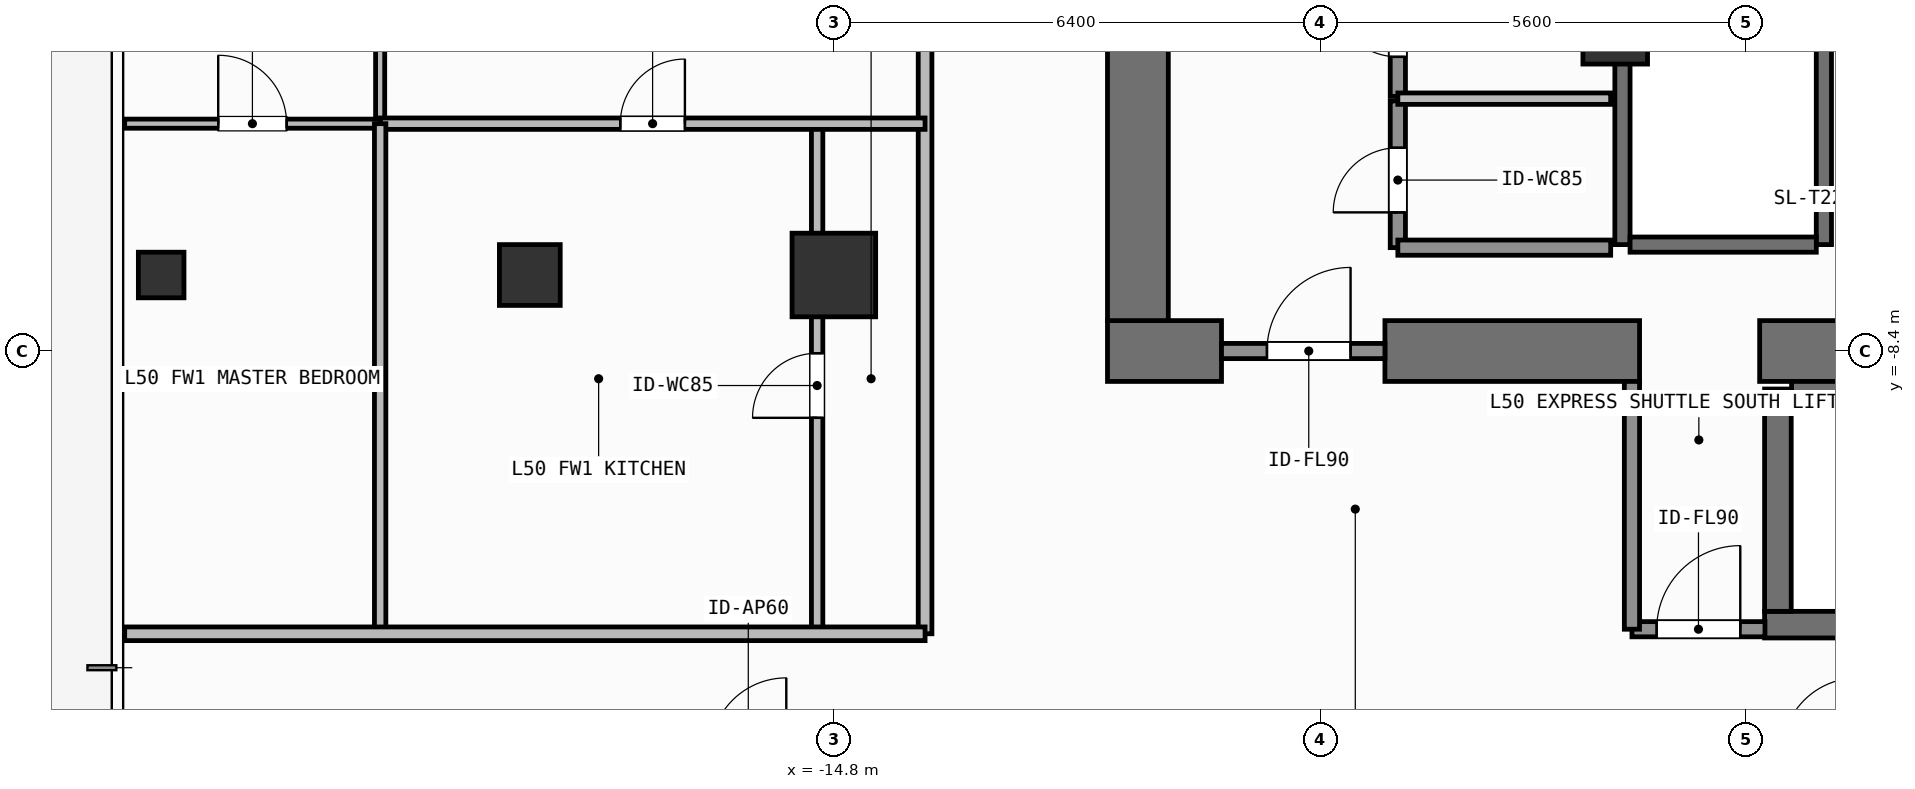
"""IFC4 building model, lengths in metres.
Left out: names, types, materials, properties, quantities, classifications, styles, units other than length and angle.
Written with IfcOpenShell. Run it as: python <this file> out.ifc"""

import sys

from ifc_helpers import new_model, si_unit, direction, frame, frame_2d, origin, origin_2d, place, context, subcontext, project, spatial, rectangle, hollow_rectangle, extrude, element, fill, save


model = new_model("IFC4")
c1 = context("Model", 3, precision=1e-05, world=origin(), true_north=direction((0.0, 1.0)))
c2 = subcontext(c1, "Body", "Model", "MODEL_VIEW")
j1 = project(units=[si_unit("LENGTHUNIT", "METRE"), si_unit("PLANEANGLEUNIT", "RADIAN")], contexts=[c1])
p1 = place(None, origin())
s1 = spatial("IfcSite", under=j1, at=p1, CompositionType="ELEMENT")
p2 = place(p1, origin())
s2 = spatial("IfcBuilding", under=s1, at=p2, CompositionType="ELEMENT")
p3 = place(p2, frame((0.0, 0.0, 203.1)))
s3 = spatial("IfcBuildingStorey", under=s2, at=p3, CompositionType="ELEMENT", Elevation=203.1)
p4 = place(p3, frame((-11.2, -8.4, 0.0), z_axis=(0.0, 0.0, 1.0), x_axis=(1.0, 0.0, 0.0)))
e1 = element("IfcWall", 1, at=p4, inside=s3, PredefinedType="SHEAR", context=c2, shape_type="SweptSolid", body=[
    extrude(rectangle(XDim=1.5, YDim=0.8, at=frame_2d((0.75, 0.0))), origin(), (0.0, 0.0, 1.0), 3.9),
])
p5 = place(p3, frame((-7.55, -8.4, 0.0), z_axis=(0.0, 0.0, 1.0), x_axis=(1.0, 0.0, 0.0)))
e2 = element("IfcWall", 2, at=p5, inside=s3, PredefinedType="SHEAR", context=c2, shape_type="SweptSolid", body=[
    extrude(rectangle(XDim=3.35, YDim=0.8, at=frame_2d((1.675, 0.0))), origin(), (0.0, 0.0, 1.0), 3.9),
])
p6 = place(p3, frame((-2.62, -8.4, 0.0), z_axis=(0.0, 0.0, 1.0), x_axis=(1.0, 0.0, 0.0)))
e3 = element("IfcWall", 3, at=p6, inside=s3, PredefinedType="SHEAR", context=c2, shape_type="SweptSolid", body=[
    extrude(rectangle(XDim=7.27, YDim=0.8, at=frame_2d((3.635, 0.0))), origin(), (0.0, 0.0, 1.0), 3.9),
])
p7 = place(p3, frame((-10.8, -8.0, 0.0), z_axis=(0.0, 0.0, 1.0), x_axis=(0.0, 1.0, 0.0)))
e4 = element("IfcWall", 4, at=p7, inside=s3, PredefinedType="SHEAR", context=c2, shape_type="SweptSolid", body=[
    extrude(rectangle(XDim=16.0, YDim=0.8, at=frame_2d((8.0, 0.0))), origin(), (0.0, 0.0, 1.0), 3.9),
])
p8 = place(p3, frame((-2.555, -12.0, 0.0), z_axis=(0.0, 0.0, 1.0), x_axis=(1.0, 0.0, 0.0)))
e5 = element("IfcWall", 5, at=p8, inside=s3, PredefinedType="SHEAR", context=c2, shape_type="SweptSolid", body=[
    extrude(rectangle(XDim=7.31, YDim=0.35, at=frame_2d((3.655, 0.0))), origin(), (0.0, 0.0, 1.0), 3.9),
])
p9 = place(p3, frame((-2.2, -8.913, 0.0), z_axis=(0.0, 0.0, 1.0), x_axis=(1.0, 0.0, 0.0)))
e6 = element("IfcWall", 6, at=p9, inside=s3, PredefinedType="SHEAR", context=c2, shape_type="SweptSolid", body=[
    extrude(rectangle(XDim=6.6, YDim=0.225, at=frame_2d((3.3, 0.0))), origin(), (0.0, 0.0, 1.0), 3.9),
])
p10 = place(p3, frame((-2.38, -11.825, 0.0), z_axis=(0.0, 0.0, 1.0), x_axis=(0.0, 1.0, 0.0)))
e7 = element("IfcWall", 7, at=p10, inside=s3, PredefinedType="SHEAR", context=c2, shape_type="SweptSolid", body=[
    extrude(rectangle(XDim=2.925, YDim=0.35, at=frame_2d((1.462, 0.0))), origin(), (0.0, 0.0, 1.0), 3.9),
])
p11 = place(p3, frame((-14.8, -7.4, 0.0), z_axis=(0.0, 0.0, 1.0), x_axis=(1.0, 0.0, 0.0)))
e8 = element("IfcColumn", 8, at=p11, inside=s3, PredefinedType="COLUMN", context=c2, shape_type="SweptSolid", body=[
    extrude(rectangle(XDim=1.1, YDim=1.1, at=origin_2d()), origin(), (0.0, 0.0, 1.0), 3.9),
])
p12 = place(p3, frame((-4.52, -4.2, 0.0), z_axis=(0.0, 0.0, 1.0), x_axis=(1.0, 0.0, 0.0)))
e9 = element("IfcColumn", 9, at=p12, inside=s3, PredefinedType="COLUMN", context=c2, shape_type="SweptSolid", body=[
    extrude(rectangle(XDim=0.85, YDim=0.85, at=origin_2d()), origin(), (0.0, 0.0, 1.0), 3.9),
])
p13 = place(p3, frame((-18.8, -7.4, 0.0), z_axis=(0.0, 0.0, 1.0), x_axis=(1.0, 0.0, 0.0)))
e10 = element("IfcColumn", 10, at=p13, inside=s3, PredefinedType="COLUMN", context=c2, shape_type="SweptSolid", body=[
    extrude(hollow_rectangle(XDim=0.8, YDim=0.8, WallThickness=0.036, at=origin_2d()), origin(), (0.0, 0.0, 1.0), 3.9),
])
p14 = place(p3, frame((-23.65, -7.4, 0.0), z_axis=(0.0, 0.0, 1.0), x_axis=(1.0, 0.0, 0.0)))
e11 = element("IfcColumn", 11, at=p14, inside=s3, PredefinedType="COLUMN", context=c2, shape_type="SweptSolid", body=[
    extrude(hollow_rectangle(XDim=0.6, YDim=0.6, WallThickness=0.028, at=origin_2d()), origin(), (0.0, 0.0, 1.0), 3.9),
])
for number, where, z_axis, x_axis in (
    (12, (-4.425, -7.0, 0.0), (0.0, 0.0, 1.0), (0.0, 1.0, 0.0)),
    (13, (-1.775, -7.0, 0.0), (0.0, 0.0, 1.0), (0.0, 1.0, 0.0)),
):
    element("IfcWall", number, at=place(p3, frame(where, z_axis=z_axis, x_axis=x_axis)), inside=s3, PredefinedType="SHEAR", context=c2, shape_type="SweptSolid", body=[
        extrude(rectangle(XDim=2.8, YDim=0.2, at=frame_2d((1.4, 0.0))), origin(), (0.0, 0.0, 1.0), 3.68),
    ])
p15 = place(p3, frame((-4.325, -7.0, 0.0), z_axis=(0.0, 0.0, 1.0), x_axis=(1.0, 0.0, 0.0)))
e14 = element("IfcWall", 14, at=p15, inside=s3, PredefinedType="SHEAR", context=c2, shape_type="SweptSolid", body=[
    extrude(rectangle(XDim=2.45, YDim=0.2, at=frame_2d((1.225, 0.0))), origin(), (0.0, 0.0, 1.0), 3.68),
])
p16 = place(p3, frame((-9.7, -8.4, 0.0), z_axis=(0.0, 0.0, 1.0), x_axis=(1.0, 0.0, 0.0)))
e15 = element("IfcWall", 15, at=p16, inside=s3, PredefinedType="SOLIDWALL", context=c2, shape_type="SweptSolid", body=[
    extrude(rectangle(XDim=2.15, YDim=0.2, at=frame_2d((1.075, 0.0))), origin(), (0.0, 0.0, 1.0), 2.82),
])
p17 = place(p16, frame((0.598, 0.0, 0.0)))
e16 = element("IfcOpeningElement", 16, at=p17, cuts=e15, PredefinedType="OPENING", context=c2, shape_type="SweptSolid", body=[
    extrude(rectangle(XDim=1.1, YDim=2.15, at=frame_2d((0.55, 1.075))), frame((0.0, 0.11, 0.0), z_axis=(0.0, -1.0, 0.0), x_axis=(1.0, 0.0, 0.0)), (0.0, 0.0, 1.0), 0.22),
])
p18 = place(p3, frame((-4.3, -12.06, 0.0), z_axis=(0.0, 0.0, 1.0), x_axis=(1.0, 0.0, 0.0)))
e17 = element("IfcWall", 17, at=p18, inside=s3, PredefinedType="SOLIDWALL", context=c2, shape_type="SweptSolid", body=[
    extrude(rectangle(XDim=1.75, YDim=0.2, at=frame_2d((0.875, 0.0))), origin(), (0.0, 0.0, 1.0), 3.68),
])
p19 = place(p18, frame((0.325, 0.0, 0.0)))
e18 = element("IfcOpeningElement", 18, at=p19, cuts=e17, PredefinedType="OPENING", context=c2, shape_type="SweptSolid", body=[
    extrude(rectangle(XDim=1.1, YDim=2.15, at=frame_2d((0.55, 1.075))), frame((0.0, 0.11, 0.0), z_axis=(0.0, -1.0, 0.0), x_axis=(1.0, 0.0, 0.0)), (0.0, 0.0, 1.0), 0.22),
])
p20 = place(p3, frame((-7.38, -7.04, 0.0), z_axis=(0.0, 0.0, 1.0), x_axis=(0.0, 1.0, 0.0)))
e19 = element("IfcWall", 19, at=p20, inside=s3, PredefinedType="SOLIDWALL", context=c2, shape_type="SweptSolid", body=[
    extrude(rectangle(XDim=1.93, YDim=0.2, at=frame_2d((0.965, 0.0))), origin(), (0.0, 0.0, 1.0), 3.68),
])
p21 = place(p20, frame((0.464, 0.0, 0.0)))
e20 = element("IfcOpeningElement", 20, at=p21, cuts=e19, PredefinedType="OPENING", context=c2, shape_type="SweptSolid", body=[
    extrude(rectangle(XDim=0.85, YDim=2.1, at=frame_2d((0.425, 1.05))), frame((0.0, 0.11, 0.0), z_axis=(0.0, -1.0, 0.0), x_axis=(1.0, 0.0, 0.0)), (0.0, 0.0, 1.0), 0.22),
])
p22 = place(p3, frame((-7.38, -5.05, 0.0), z_axis=(0.0, 0.0, 1.0), x_axis=(0.0, 1.0, 0.0)))
e21 = element("IfcWall", 21, at=p22, inside=s3, PredefinedType="SOLIDWALL", context=c2, shape_type="SweptSolid", body=[
    extrude(rectangle(XDim=1.89, YDim=0.2, at=frame_2d((0.945, 0.0))), origin(), (0.0, 0.0, 1.0), 3.68),
])
p23 = place(p22, frame((0.52, 0.0, 0.0)))
e22 = element("IfcOpeningElement", 22, at=p23, cuts=e21, PredefinedType="OPENING", context=c2, shape_type="SweptSolid", body=[
    extrude(rectangle(XDim=0.85, YDim=2.1, at=frame_2d((0.425, 1.05))), frame((0.0, 0.11, 0.0), z_axis=(0.0, -1.0, 0.0), x_axis=(1.0, 0.0, 0.0)), (0.0, 0.0, 1.0), 0.22),
])
p24 = place(p3, frame((-13.6, -12.12, 0.0), z_axis=(0.0, 0.0, 1.0), x_axis=(0.0, 1.0, 0.0)))
e23 = element("IfcWall", 23, at=p24, inside=s3, PredefinedType="PARTITIONING", context=c2, shape_type="SweptSolid", body=[
    extrude(rectangle(XDim=23.55, YDim=0.18, at=frame_2d((11.775, 0.0))), origin(), (0.0, 0.0, 1.0), 3.68),
])
p25 = place(p24, frame((11.454, 0.0, 0.0)))
e24 = element("IfcOpeningElement", 24, at=p25, cuts=e23, PredefinedType="OPENING", context=c2, shape_type="SweptSolid", body=[
    extrude(rectangle(XDim=1.0, YDim=2.2, at=frame_2d((0.5, 1.1))), frame((0.0, 0.1, 0.0), z_axis=(0.0, -1.0, 0.0), x_axis=(1.0, 0.0, 0.0)), (0.0, 0.0, 1.0), 0.2),
])
p26 = place(p3, frame((-20.769, -5.409, 0.0), z_axis=(0.0, 0.0, 1.0), x_axis=(0.0, 1.0, 0.0)))
e25 = element("IfcWall", 25, at=p26, inside=s3, PredefinedType="PARTITIONING", context=c2, shape_type="SweptSolid", body=[
    extrude(rectangle(XDim=10.691, YDim=0.12, at=frame_2d((5.345, 0.0))), origin(), (0.0, 0.0, 1.0), 3.68),
])
p27 = place(p26, frame((4.806, 0.0, 0.0)))
e26 = element("IfcOpeningElement", 26, at=p27, cuts=e25, PredefinedType="OPENING", context=c2, shape_type="SweptSolid", body=[
    extrude(rectangle(XDim=0.9, YDim=2.1, at=frame_2d((0.45, 1.05))), frame((0.0, 0.07, 0.0), z_axis=(0.0, -1.0, 0.0), x_axis=(1.0, 0.0, 0.0)), (0.0, 0.0, 1.0), 0.14),
])
p28 = place(p3, frame((-15.02, -12.12, 0.0), z_axis=(0.0, 0.0, 1.0), x_axis=(0.0, 1.0, 0.0)))
e27 = element("IfcWall", 27, at=p28, inside=s3, PredefinedType="PARTITIONING", context=c2, shape_type="SweptSolid", body=[
    extrude(rectangle(XDim=6.711, YDim=0.15, at=frame_2d((3.355, 0.0))), origin(), (0.0, 0.0, 1.0), 3.182),
])
p29 = place(p28, frame((2.841, 0.0, 0.0)))
e28 = element("IfcOpeningElement", 28, at=p29, cuts=e27, PredefinedType="OPENING", context=c2, shape_type="SweptSolid", body=[
    extrude(rectangle(XDim=0.85, YDim=2.1, at=frame_2d((0.425, 1.05))), frame((0.0, 0.085, 0.0), z_axis=(0.0, -1.0, 0.0), x_axis=(1.0, 0.0, 0.0)), (0.0, 0.0, 1.0), 0.17),
])
p30 = place(p3, frame((-20.769, -5.409, 0.0), z_axis=(0.0, 0.0, 1.0), x_axis=(1.0, 0.0, 0.0)))
e29 = element("IfcWall", 29, at=p30, inside=s3, PredefinedType="PARTITIONING", context=c2, shape_type="SweptSolid", body=[
    extrude(rectangle(XDim=7.169, YDim=0.15, at=frame_2d((3.584, 0.0))), origin(), (0.0, 0.0, 1.0), 3.68),
])
p31 = place(p30, frame((3.159, 0.0, 0.0)))
e30 = element("IfcOpeningElement", 30, at=p31, cuts=e29, PredefinedType="OPENING", context=c2, shape_type="SweptSolid", body=[
    extrude(rectangle(XDim=0.85, YDim=2.1, at=frame_2d((0.425, 1.05))), frame((0.0, 0.085, 0.0), z_axis=(0.0, -1.0, 0.0), x_axis=(1.0, 0.0, 0.0)), (0.0, 0.0, 1.0), 0.17),
])
p32 = place(p3, frame((-24.13, -5.409, 0.0), z_axis=(0.0, 0.0, 1.0), x_axis=(1.0, 0.0, 0.0)))
e31 = element("IfcWall", 31, at=p32, inside=s3, PredefinedType="PARTITIONING", context=c2, shape_type="SweptSolid", body=[
    extrude(rectangle(XDim=3.361, YDim=0.12, at=frame_2d((1.68, 0.0))), origin(), (0.0, 0.0, 1.0), 3.68),
])
p33 = place(p32, frame((1.23, 0.0, 0.0)))
e32 = element("IfcOpeningElement", 32, at=p33, cuts=e31, PredefinedType="OPENING", context=c2, shape_type="SweptSolid", body=[
    extrude(rectangle(XDim=0.9, YDim=2.1, at=frame_2d((0.45, 1.05))), frame((0.0, 0.07, 0.0), z_axis=(0.0, -1.0, 0.0), x_axis=(1.0, 0.0, 0.0)), (0.0, 0.0, 1.0), 0.14),
])
p34 = place(p3, frame((-4.3, -12.06, 0.0), z_axis=(0.0, 0.0, 1.0), x_axis=(0.0, 1.0, 0.0)))
e33 = element("IfcWall", 33, at=p34, inside=s3, PredefinedType="SOLIDWALL", context=c2, shape_type="SweptSolid", body=[
    extrude(rectangle(XDim=3.26, YDim=0.2, at=frame_2d((1.63, 0.0))), origin(), (0.0, 0.0, 1.0), 3.68),
])
p35 = place(p3, frame((-7.38, -7.04, 0.0), z_axis=(0.0, 0.0, 1.0), x_axis=(1.0, 0.0, 0.0)))
e34 = element("IfcWall", 34, at=p35, inside=s3, PredefinedType="SOLIDWALL", context=c2, shape_type="SweptSolid", body=[
    extrude(rectangle(XDim=2.8, YDim=0.2, at=frame_2d((1.4, 0.0))), origin(), (0.0, 0.0, 1.0), 3.68),
])
p36 = place(p3, frame((-7.38, -5.08, 0.0), z_axis=(0.0, 0.0, 1.0), x_axis=(1.0, 0.0, 0.0)))
e35 = element("IfcWall", 35, at=p36, inside=s3, PredefinedType="PARTITIONING", context=c2, shape_type="SweptSolid", body=[
    extrude(rectangle(XDim=2.8, YDim=0.15, at=frame_2d((1.4, 0.0))), origin(), (0.0, 0.0, 1.0), 3.68),
])
p37 = place(p3, frame((-20.769, -12.12, 0.0), z_axis=(0.0, 0.0, 1.0), x_axis=(0.0, 1.0, 0.0)))
e36 = element("IfcWall", 36, at=p37, inside=s3, PredefinedType="PARTITIONING", context=c2, shape_type="SweptSolid", body=[
    extrude(rectangle(XDim=6.711, YDim=0.15, at=frame_2d((3.355, 0.0))), origin(), (0.0, 0.0, 1.0), 3.68),
])
p38 = place(p3, frame((-24.13, -12.12, 0.0), z_axis=(0.0, 0.0, 1.0), x_axis=(1.0, 0.0, 0.0)))
e37 = element("IfcWall", 37, at=p38, inside=s3, PredefinedType="PARTITIONING", context=c2, shape_type="SweptSolid", body=[
    extrude(rectangle(XDim=10.53, YDim=0.18, at=frame_2d((5.265, 0.0))), origin(), (0.0, 0.0, 1.0), 3.68),
])
p39 = place(p17, origin())
e38 = element("IfcDoor", 38, at=p39, inside=s3, OperationType="SINGLE_SWING_RIGHT", PredefinedType="DOOR", context=c2, shape_type="SweptSolid", body=[
    extrude(rectangle(XDim=1.1, YDim=2.15, at=frame_2d((0.55, 1.075))), frame((0.0, 0.025, 0.0), z_axis=(0.0, -1.0, 0.0), x_axis=(1.0, 0.0, 0.0)), (0.0, 0.0, 1.0), 0.05),
])
fill(e16, e38)
p40 = place(p19, origin())
e39 = element("IfcDoor", 39, at=p40, inside=s3, OperationType="SINGLE_SWING_RIGHT", PredefinedType="DOOR", context=c2, shape_type="SweptSolid", body=[
    extrude(rectangle(XDim=1.1, YDim=2.15, at=frame_2d((0.55, 1.075))), frame((0.0, 0.025, 0.0), z_axis=(0.0, -1.0, 0.0), x_axis=(1.0, 0.0, 0.0)), (0.0, 0.0, 1.0), 0.05),
])
fill(e18, e39)
p41 = place(p21, origin())
e40 = element("IfcDoor", 40, at=p41, inside=s3, OperationType="SINGLE_SWING_LEFT", PredefinedType="DOOR", context=c2, shape_type="SweptSolid", body=[
    extrude(rectangle(XDim=0.85, YDim=2.1, at=frame_2d((0.425, 1.05))), frame((0.0, 0.025, 0.0), z_axis=(0.0, -1.0, 0.0), x_axis=(1.0, 0.0, 0.0)), (0.0, 0.0, 1.0), 0.05),
])
fill(e20, e40)
p42 = place(p23, origin())
e41 = element("IfcDoor", 41, at=p42, inside=s3, OperationType="SINGLE_SWING_RIGHT", PredefinedType="DOOR", context=c2, shape_type="SweptSolid", body=[
    extrude(rectangle(XDim=0.85, YDim=2.1, at=frame_2d((0.425, 1.05))), frame((0.0, 0.025, 0.0), z_axis=(0.0, -1.0, 0.0), x_axis=(1.0, 0.0, 0.0)), (0.0, 0.0, 1.0), 0.05),
])
fill(e22, e41)
p43 = place(p29, origin())
e42 = element("IfcDoor", 42, at=p43, inside=s3, OperationType="SINGLE_SWING_LEFT", PredefinedType="DOOR", context=c2, shape_type="SweptSolid", body=[
    extrude(rectangle(XDim=0.85, YDim=2.1, at=frame_2d((0.425, 1.05))), frame((0.0, 0.025, 0.0), z_axis=(0.0, -1.0, 0.0), x_axis=(1.0, 0.0, 0.0)), (0.0, 0.0, 1.0), 0.05),
])
fill(e28, e42)
p44 = place(p31, origin())
e43 = element("IfcDoor", 43, at=p44, inside=s3, OperationType="SINGLE_SWING_RIGHT", PredefinedType="DOOR", context=c2, shape_type="SweptSolid", body=[
    extrude(rectangle(XDim=0.85, YDim=2.1, at=frame_2d((0.425, 1.05))), frame((0.0, 0.025, 0.0), z_axis=(0.0, -1.0, 0.0), x_axis=(1.0, 0.0, 0.0)), (0.0, 0.0, 1.0), 0.05),
])
fill(e30, e43)
p45 = place(p33, origin())
e44 = element("IfcDoor", 44, at=p45, inside=s3, OperationType="SINGLE_SWING_LEFT", PredefinedType="DOOR", context=c2, shape_type="SweptSolid", body=[
    extrude(rectangle(XDim=0.9, YDim=2.1, at=frame_2d((0.45, 1.05))), frame((0.0, 0.025, 0.0), z_axis=(0.0, -1.0, 0.0), x_axis=(1.0, 0.0, 0.0)), (0.0, 0.0, 1.0), 0.05),
])
fill(e32, e44)
save(model, sys.argv[1])
